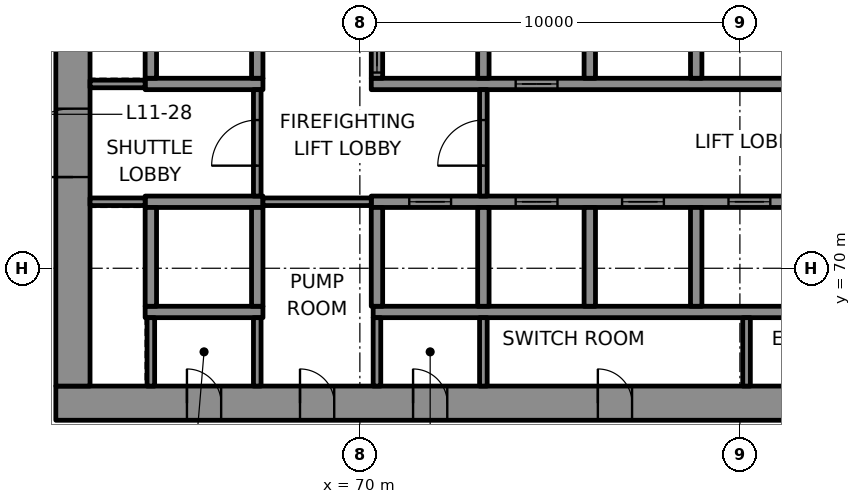
"""IFC4 building model, lengths in metres.
Left out: names, types, materials, properties, quantities, classifications, styles, units other than length and angle.
Written with IfcOpenShell. Run it as: python <this file> out.ifc"""

import sys

from ifc_helpers import new_model, si_unit, direction, frame, frame_2d, origin, place, context, subcontext, project, spatial, rectangle, extrude, element, fill, save


model = new_model("IFC4")
c1 = context("Model", 3, precision=1e-05, world=origin(), true_north=direction((0.0, 1.0)))
c2 = subcontext(c1, "Body", "Model", "MODEL_VIEW")
j1 = project(units=[si_unit("LENGTHUNIT", "METRE"), si_unit("PLANEANGLEUNIT", "RADIAN")], contexts=[c1])
p1 = place(None, origin())
s1 = spatial("IfcSite", under=j1, at=p1, CompositionType="ELEMENT")
p2 = place(p1, origin())
s2 = spatial("IfcBuilding", under=s1, at=p2, CompositionType="ELEMENT")
p3 = place(p2, frame((0.0, 0.0, 52.6)))
s3 = spatial("IfcBuildingStorey", under=s2, at=p3, CompositionType="ELEMENT", Elevation=52.6)
p4 = place(p3, frame((62.0, 66.45, 0.0), z_axis=(0.0, 0.0, 1.0), x_axis=(1.0, 0.0, 0.0)))
e1 = element("IfcWall", 1, at=p4, inside=s3, PredefinedType="SHEAR", context=c2, shape_type="SweptSolid", body=[
    extrude(rectangle(XDim=26.0, YDim=0.9, at=frame_2d((13.0, 0.0))), origin(), (0.0, 0.0, 1.0), 4.0),
])
p5 = place(p4, frame((3.45, 0.0, 0.0)))
e2 = element("IfcOpeningElement", 2, at=p5, cuts=e1, PredefinedType="OPENING", context=c2, shape_type="SweptSolid", body=[
    extrude(rectangle(XDim=0.9, YDim=2.1, at=frame_2d((0.45, 1.05))), frame((0.0, 0.46, 0.0), z_axis=(0.0, -1.0, 0.0), x_axis=(1.0, 0.0, 0.0)), (0.0, 0.0, 1.0), 0.92),
])
p6 = place(p4, frame((6.425, 0.0, 0.0)))
e3 = element("IfcOpeningElement", 3, at=p6, cuts=e1, PredefinedType="OPENING", context=c2, shape_type="SweptSolid", body=[
    extrude(rectangle(XDim=0.9, YDim=2.1, at=frame_2d((0.45, 1.05))), frame((0.0, 0.46, 0.0), z_axis=(0.0, -1.0, 0.0), x_axis=(1.0, 0.0, 0.0)), (0.0, 0.0, 1.0), 0.92),
])
p7 = place(p4, frame((9.4, 0.0, 0.0)))
e4 = element("IfcOpeningElement", 4, at=p7, cuts=e1, PredefinedType="OPENING", context=c2, shape_type="SweptSolid", body=[
    extrude(rectangle(XDim=0.9, YDim=2.1, at=frame_2d((0.45, 1.05))), frame((0.0, 0.46, 0.0), z_axis=(0.0, -1.0, 0.0), x_axis=(1.0, 0.0, 0.0)), (0.0, 0.0, 1.0), 0.92),
])
p8 = place(p4, frame((14.262, 0.0, 0.0)))
e5 = element("IfcOpeningElement", 5, at=p8, cuts=e1, PredefinedType="OPENING", context=c2, shape_type="SweptSolid", body=[
    extrude(rectangle(XDim=0.9, YDim=2.1, at=frame_2d((0.45, 1.05))), frame((0.0, 0.46, 0.0), z_axis=(0.0, -1.0, 0.0), x_axis=(1.0, 0.0, 0.0)), (0.0, 0.0, 1.0), 0.92),
])
p9 = place(p4, frame((21.188, 0.0, 0.0)))
e6 = element("IfcOpeningElement", 6, at=p9, cuts=e1, PredefinedType="OPENING", context=c2, shape_type="SweptSolid", body=[
    extrude(rectangle(XDim=0.9, YDim=2.1, at=frame_2d((0.45, 1.05))), frame((0.0, 0.46, 0.0), z_axis=(0.0, -1.0, 0.0), x_axis=(1.0, 0.0, 0.0)), (0.0, 0.0, 1.0), 0.92),
])
p10 = place(p3, frame((62.45, 66.9, 0.0), z_axis=(0.0, 0.0, 1.0), x_axis=(0.0, 1.0, 0.0)))
e7 = element("IfcWall", 7, at=p10, inside=s3, PredefinedType="SHEAR", context=c2, shape_type="SweptSolid", body=[
    extrude(rectangle(XDim=16.2, YDim=0.9, at=frame_2d((8.1, 0.0))), origin(), (0.0, 0.0, 1.0), 4.0),
])
p11 = place(p10, frame((5.5, 0.0, 0.0)))
e8 = element("IfcOpeningElement", 8, at=p11, cuts=e7, PredefinedType="OPENING", context=c2, shape_type="SweptSolid", body=[
    extrude(rectangle(XDim=1.8, YDim=2.1, at=frame_2d((0.9, 1.05))), frame((0.0, 0.46, 0.0), z_axis=(0.0, -1.0, 0.0), x_axis=(1.0, 0.0, 0.0)), (0.0, 0.0, 1.0), 0.92),
])
p12 = place(p3, frame((64.35, 68.85, 0.0), z_axis=(0.0, 0.0, 1.0), x_axis=(1.0, 0.0, 0.0)))
e9 = element("IfcWall", 9, at=p12, inside=s3, PredefinedType="SHEAR", context=c2, shape_type="SweptSolid", body=[
    extrude(rectangle(XDim=3.1, YDim=0.3, at=frame_2d((1.55, 0.0))), origin(), (0.0, 0.0, 1.0), 4.0),
])
p13 = place(p3, frame((70.35, 68.85, 0.0), z_axis=(0.0, 0.0, 1.0), x_axis=(1.0, 0.0, 0.0)))
e10 = element("IfcWall", 10, at=p13, inside=s3, PredefinedType="SHEAR", context=c2, shape_type="SweptSolid", body=[
    extrude(rectangle(XDim=16.75, YDim=0.3, at=frame_2d((8.375, 0.0))), origin(), (0.0, 0.0, 1.0), 4.0),
])
p14 = place(p3, frame((64.35, 71.75, 0.0), z_axis=(0.0, 0.0, 1.0), x_axis=(1.0, 0.0, 0.0)))
e11 = element("IfcWall", 11, at=p14, inside=s3, PredefinedType="SHEAR", context=c2, shape_type="SweptSolid", body=[
    extrude(rectangle(XDim=3.1, YDim=0.3, at=frame_2d((1.55, 0.0))), origin(), (0.0, 0.0, 1.0), 4.0),
])
p15 = place(p3, frame((70.3, 71.75, 0.0), z_axis=(0.0, 0.0, 1.0), x_axis=(1.0, 0.0, 0.0)))
e12 = element("IfcWall", 12, at=p15, inside=s3, PredefinedType="SHEAR", context=c2, shape_type="SweptSolid", body=[
    extrude(rectangle(XDim=16.8, YDim=0.3, at=frame_2d((8.4, 0.0))), origin(), (0.0, 0.0, 1.0), 4.0),
])
p16 = place(p15, frame((1.0, 0.0, 0.0)))
e13 = element("IfcOpeningElement", 13, at=p16, cuts=e12, PredefinedType="OPENING", context=c2, shape_type="SweptSolid", body=[
    extrude(rectangle(XDim=1.1, YDim=2.1, at=frame_2d((0.55, 1.05))), frame((0.0, 0.16, 0.0), z_axis=(0.0, -1.0, 0.0), x_axis=(1.0, 0.0, 0.0)), (0.0, 0.0, 1.0), 0.32),
])
p17 = place(p15, frame((3.8, 0.0, 0.0)))
e14 = element("IfcOpeningElement", 14, at=p17, cuts=e12, PredefinedType="OPENING", context=c2, shape_type="SweptSolid", body=[
    extrude(rectangle(XDim=1.1, YDim=2.1, at=frame_2d((0.55, 1.05))), frame((0.0, 0.16, 0.0), z_axis=(0.0, -1.0, 0.0), x_axis=(1.0, 0.0, 0.0)), (0.0, 0.0, 1.0), 0.32),
])
p18 = place(p15, frame((6.6, 0.0, 0.0)))
e15 = element("IfcOpeningElement", 15, at=p18, cuts=e12, PredefinedType="OPENING", context=c2, shape_type="SweptSolid", body=[
    extrude(rectangle(XDim=1.1, YDim=2.1, at=frame_2d((0.55, 1.05))), frame((0.0, 0.16, 0.0), z_axis=(0.0, -1.0, 0.0), x_axis=(1.0, 0.0, 0.0)), (0.0, 0.0, 1.0), 0.32),
])
p19 = place(p15, frame((9.4, 0.0, 0.0)))
e16 = element("IfcOpeningElement", 16, at=p19, cuts=e12, PredefinedType="OPENING", context=c2, shape_type="SweptSolid", body=[
    extrude(rectangle(XDim=1.1, YDim=2.1, at=frame_2d((0.55, 1.05))), frame((0.0, 0.16, 0.0), z_axis=(0.0, -1.0, 0.0), x_axis=(1.0, 0.0, 0.0)), (0.0, 0.0, 1.0), 0.32),
])
p20 = place(p15, frame((12.2, 0.0, 0.0)))
e17 = element("IfcOpeningElement", 17, at=p20, cuts=e12, PredefinedType="OPENING", context=c2, shape_type="SweptSolid", body=[
    extrude(rectangle(XDim=1.1, YDim=2.1, at=frame_2d((0.55, 1.05))), frame((0.0, 0.16, 0.0), z_axis=(0.0, -1.0, 0.0), x_axis=(1.0, 0.0, 0.0)), (0.0, 0.0, 1.0), 0.32),
])
p21 = place(p15, frame((14.925, 0.0, 0.0)))
e18 = element("IfcOpeningElement", 18, at=p21, cuts=e12, PredefinedType="OPENING", context=c2, shape_type="SweptSolid", body=[
    extrude(rectangle(XDim=1.1, YDim=2.1, at=frame_2d((0.55, 1.05))), frame((0.0, 0.16, 0.0), z_axis=(0.0, -1.0, 0.0), x_axis=(1.0, 0.0, 0.0)), (0.0, 0.0, 1.0), 0.32),
])
p22 = place(p3, frame((64.35, 74.85, 0.0), z_axis=(0.0, 0.0, 1.0), x_axis=(1.0, 0.0, 0.0)))
e19 = element("IfcWall", 19, at=p22, inside=s3, PredefinedType="SHEAR", context=c2, shape_type="SweptSolid", body=[
    extrude(rectangle(XDim=3.1, YDim=0.3, at=frame_2d((1.55, 0.0))), origin(), (0.0, 0.0, 1.0), 4.0),
])
p23 = place(p3, frame((70.3, 74.85, 0.0), z_axis=(0.0, 0.0, 1.0), x_axis=(1.0, 0.0, 0.0)))
e20 = element("IfcWall", 20, at=p23, inside=s3, PredefinedType="SHEAR", context=c2, shape_type="SweptSolid", body=[
    extrude(rectangle(XDim=16.8, YDim=0.3, at=frame_2d((8.4, 0.0))), origin(), (0.0, 0.0, 1.0), 4.0),
])
p24 = place(p23, frame((3.8, 0.0, 0.0)))
e21 = element("IfcOpeningElement", 21, at=p24, cuts=e20, PredefinedType="OPENING", context=c2, shape_type="SweptSolid", body=[
    extrude(rectangle(XDim=1.1, YDim=2.1, at=frame_2d((0.55, 1.05))), frame((0.0, 0.16, 0.0), z_axis=(0.0, -1.0, 0.0), x_axis=(1.0, 0.0, 0.0)), (0.0, 0.0, 1.0), 0.32),
])
p25 = place(p23, frame((12.2, 0.0, 0.0)))
e22 = element("IfcOpeningElement", 22, at=p25, cuts=e20, PredefinedType="OPENING", context=c2, shape_type="SweptSolid", body=[
    extrude(rectangle(XDim=1.1, YDim=2.1, at=frame_2d((0.55, 1.05))), frame((0.0, 0.16, 0.0), z_axis=(0.0, -1.0, 0.0), x_axis=(1.0, 0.0, 0.0)), (0.0, 0.0, 1.0), 0.32),
])
p26 = place(p23, frame((14.925, 0.0, 0.0)))
e23 = element("IfcOpeningElement", 23, at=p26, cuts=e20, PredefinedType="OPENING", context=c2, shape_type="SweptSolid", body=[
    extrude(rectangle(XDim=1.1, YDim=2.1, at=frame_2d((0.55, 1.05))), frame((0.0, 0.16, 0.0), z_axis=(0.0, -1.0, 0.0), x_axis=(1.0, 0.0, 0.0)), (0.0, 0.0, 1.0), 0.32),
])
for number, where, z_axis, x_axis in (
    (24, (64.5, 69.0, 0.0), (0.0, 0.0, 1.0), (0.0, 1.0, 0.0)),
    (25, (64.5, 75.0, 0.0), (0.0, 0.0, 1.0), (0.0, 1.0, 0.0)),
    (26, (67.3, 69.0, 0.0), (0.0, 0.0, 1.0), (0.0, 1.0, 0.0)),
    (27, (67.3, 75.0, 0.0), (0.0, 0.0, 1.0), (0.0, 1.0, 0.0)),
    (28, (70.45, 69.0, 0.0), (0.0, 0.0, 1.0), (0.0, 1.0, 0.0)),
):
    element("IfcWall", number, at=place(p3, frame(where, z_axis=z_axis, x_axis=x_axis)), inside=s3, PredefinedType="SHEAR", context=c2, shape_type="SweptSolid", body=[
        extrude(rectangle(XDim=2.6, YDim=0.3, at=frame_2d((1.3, 0.0))), origin(), (0.0, 0.0, 1.0), 4.0),
    ])
p27 = place(p3, frame((70.45, 75.0, 0.0), z_axis=(0.0, 0.0, 1.0), x_axis=(0.0, 1.0, 0.0)))
e29 = element("IfcWall", 29, at=p27, inside=s3, PredefinedType="SHEAR", context=c2, shape_type="SweptSolid", body=[
    extrude(rectangle(XDim=2.6, YDim=0.3, at=frame_2d((1.3, 0.0))), origin(), (0.0, 0.0, 1.0), 4.0),
])
p28 = place(p27, frame((0.15, 0.0, 0.0)))
e30 = element("IfcOpeningElement", 30, at=p28, cuts=e29, PredefinedType="OPENING", context=c2, shape_type="SweptSolid", body=[
    extrude(rectangle(XDim=1.1, YDim=2.1, at=frame_2d((0.55, 1.05))), frame((0.0, 0.16, 0.0), z_axis=(0.0, -1.0, 0.0), x_axis=(1.0, 0.0, 0.0)), (0.0, 0.0, 1.0), 0.32),
])
for number, where, z_axis, x_axis in (
    (31, (73.25, 69.0, 0.0), (0.0, 0.0, 1.0), (0.0, 1.0, 0.0)),
    (32, (73.25, 75.0, 0.0), (0.0, 0.0, 1.0), (0.0, 1.0, 0.0)),
    (33, (76.05, 69.0, 0.0), (0.0, 0.0, 1.0), (0.0, 1.0, 0.0)),
    (34, (76.05, 75.0, 0.0), (0.0, 0.0, 1.0), (0.0, 1.0, 0.0)),
    (35, (78.85, 69.0, 0.0), (0.0, 0.0, 1.0), (0.0, 1.0, 0.0)),
    (36, (78.85, 75.0, 0.0), (0.0, 0.0, 1.0), (0.0, 1.0, 0.0)),
):
    element("IfcWall", number, at=place(p3, frame(where, z_axis=z_axis, x_axis=x_axis)), inside=s3, PredefinedType="SHEAR", context=c2, shape_type="SweptSolid", body=[
        extrude(rectangle(XDim=2.6, YDim=0.3, at=frame_2d((1.3, 0.0))), origin(), (0.0, 0.0, 1.0), 4.0),
    ])
p29 = place(p3, frame((110.994, 61.012, 0.0), z_axis=(0.0, 0.0, 1.0), x_axis=(-0.500000853759, 0.866024910866, 0.0)))
e37 = element("IfcWall", 37, at=p29, inside=s3, PredefinedType="SOLIDWALL", context=c2, shape_type="SweptSolid", body=[
    extrude(rectangle(XDim=60.222, YDim=0.8, at=frame_2d((30.111, 0.0))), origin(), (0.0, 0.0, 1.0), 0.9),
])
p30 = place(p3, frame((62.9, 71.75, 0.0), z_axis=(0.0, 0.0, 1.0), x_axis=(1.0, 0.0, 0.0)))
e38 = element("IfcWall", 38, at=p30, inside=s3, PredefinedType="PARTITIONING", context=c2, shape_type="SweptSolid", body=[
    extrude(rectangle(XDim=1.45, YDim=0.2, at=frame_2d((0.725, 0.0))), origin(), (0.0, 0.0, 1.0), 4.0),
])
p31 = place(p3, frame((67.45, 71.75, 0.0), z_axis=(0.0, 0.0, 1.0), x_axis=(1.0, 0.0, 0.0)))
e39 = element("IfcWall", 39, at=p31, inside=s3, PredefinedType="PARTITIONING", context=c2, shape_type="SweptSolid", body=[
    extrude(rectangle(XDim=2.85, YDim=0.2, at=frame_2d((1.425, 0.0))), origin(), (0.0, 0.0, 1.0), 4.0),
])
p32 = place(p3, frame((62.9, 74.85, 0.0), z_axis=(0.0, 0.0, 1.0), x_axis=(1.0, 0.0, 0.0)))
e40 = element("IfcWall", 40, at=p32, inside=s3, PredefinedType="PARTITIONING", context=c2, shape_type="SweptSolid", body=[
    extrude(rectangle(XDim=1.45, YDim=0.2, at=frame_2d((0.725, 0.0))), origin(), (0.0, 0.0, 1.0), 4.0),
])
for number, where, z_axis, x_axis in (
    (41, (64.5, 66.9, 0.0), (0.0, 0.0, 1.0), (0.0, 1.0, 0.0)),
    (42, (67.3, 66.9, 0.0), (0.0, 0.0, 1.0), (0.0, 1.0, 0.0)),
):
    element("IfcWall", number, at=place(p3, frame(where, z_axis=z_axis, x_axis=x_axis)), inside=s3, PredefinedType="PARTITIONING", context=c2, shape_type="SweptSolid", body=[
        extrude(rectangle(XDim=1.8, YDim=0.2, at=frame_2d((0.9, 0.0))), origin(), (0.0, 0.0, 1.0), 4.0),
    ])
p33 = place(p3, frame((67.3, 71.9, 0.0), z_axis=(0.0, 0.0, 1.0), x_axis=(0.0, 1.0, 0.0)))
e43 = element("IfcWall", 43, at=p33, inside=s3, PredefinedType="PARTITIONING", context=c2, shape_type="SweptSolid", body=[
    extrude(rectangle(XDim=2.8, YDim=0.2, at=frame_2d((1.4, 0.0))), origin(), (0.0, 0.0, 1.0), 4.0),
])
p34 = place(p33, frame((0.8, 0.0, 0.0)))
e44 = element("IfcOpeningElement", 44, at=p34, cuts=e43, PredefinedType="OPENING", context=c2, shape_type="SweptSolid", body=[
    extrude(rectangle(XDim=1.2, YDim=2.1, at=frame_2d((0.6, 1.05))), frame((0.0, 0.11, 0.0), z_axis=(0.0, -1.0, 0.0), x_axis=(1.0, 0.0, 0.0)), (0.0, 0.0, 1.0), 0.22),
])
for number, where, z_axis, x_axis in (
    (45, (70.45, 66.9, 0.0), (0.0, 0.0, 1.0), (0.0, 1.0, 0.0)),
    (46, (73.25, 66.9, 0.0), (0.0, 0.0, 1.0), (0.0, 1.0, 0.0)),
):
    element("IfcWall", number, at=place(p3, frame(where, z_axis=z_axis, x_axis=x_axis)), inside=s3, PredefinedType="PARTITIONING", context=c2, shape_type="SweptSolid", body=[
        extrude(rectangle(XDim=1.8, YDim=0.2, at=frame_2d((0.9, 0.0))), origin(), (0.0, 0.0, 1.0), 4.0),
    ])
p35 = place(p3, frame((73.25, 71.9, 0.0), z_axis=(0.0, 0.0, 1.0), x_axis=(0.0, 1.0, 0.0)))
e47 = element("IfcWall", 47, at=p35, inside=s3, PredefinedType="PARTITIONING", context=c2, shape_type="SweptSolid", body=[
    extrude(rectangle(XDim=2.8, YDim=0.2, at=frame_2d((1.4, 0.0))), origin(), (0.0, 0.0, 1.0), 4.0),
])
p36 = place(p35, frame((0.8, 0.0, 0.0)))
e48 = element("IfcOpeningElement", 48, at=p36, cuts=e47, PredefinedType="OPENING", context=c2, shape_type="SweptSolid", body=[
    extrude(rectangle(XDim=1.2, YDim=2.1, at=frame_2d((0.6, 1.05))), frame((0.0, 0.11, 0.0), z_axis=(0.0, -1.0, 0.0), x_axis=(1.0, 0.0, 0.0)), (0.0, 0.0, 1.0), 0.22),
])
p37 = place(p3, frame((80.175, 66.9, 0.0), z_axis=(0.0, 0.0, 1.0), x_axis=(0.0, 1.0, 0.0)))
e49 = element("IfcWall", 49, at=p37, inside=s3, PredefinedType="PARTITIONING", context=c2, shape_type="SweptSolid", body=[
    extrude(rectangle(XDim=1.8, YDim=0.2, at=frame_2d((0.9, 0.0))), origin(), (0.0, 0.0, 1.0), 4.0),
])
p38 = place(p16, origin())
e50 = element("IfcDoor", 50, at=p38, inside=s3, OperationType="DOUBLE_DOOR_SLIDING", PredefinedType="DOOR", context=c2, shape_type="SweptSolid", body=[
    extrude(rectangle(XDim=1.1, YDim=2.1, at=frame_2d((0.55, 1.05))), frame((0.0, 0.025, 0.0), z_axis=(0.0, -1.0, 0.0), x_axis=(1.0, 0.0, 0.0)), (0.0, 0.0, 1.0), 0.05),
])
fill(e13, e50)
p39 = place(p17, origin())
e51 = element("IfcDoor", 51, at=p39, inside=s3, OperationType="DOUBLE_DOOR_SLIDING", PredefinedType="DOOR", context=c2, shape_type="SweptSolid", body=[
    extrude(rectangle(XDim=1.1, YDim=2.1, at=frame_2d((0.55, 1.05))), frame((0.0, 0.025, 0.0), z_axis=(0.0, -1.0, 0.0), x_axis=(1.0, 0.0, 0.0)), (0.0, 0.0, 1.0), 0.05),
])
fill(e14, e51)
p40 = place(p18, origin())
e52 = element("IfcDoor", 52, at=p40, inside=s3, OperationType="DOUBLE_DOOR_SLIDING", PredefinedType="DOOR", context=c2, shape_type="SweptSolid", body=[
    extrude(rectangle(XDim=1.1, YDim=2.1, at=frame_2d((0.55, 1.05))), frame((0.0, 0.025, 0.0), z_axis=(0.0, -1.0, 0.0), x_axis=(1.0, 0.0, 0.0)), (0.0, 0.0, 1.0), 0.05),
])
fill(e15, e52)
p41 = place(p19, origin())
e53 = element("IfcDoor", 53, at=p41, inside=s3, OperationType="DOUBLE_DOOR_SLIDING", PredefinedType="DOOR", context=c2, shape_type="SweptSolid", body=[
    extrude(rectangle(XDim=1.1, YDim=2.1, at=frame_2d((0.55, 1.05))), frame((0.0, 0.025, 0.0), z_axis=(0.0, -1.0, 0.0), x_axis=(1.0, 0.0, 0.0)), (0.0, 0.0, 1.0), 0.05),
])
fill(e16, e53)
p42 = place(p28, origin())
e54 = element("IfcDoor", 54, at=p42, inside=s3, OperationType="DOUBLE_DOOR_SLIDING", PredefinedType="DOOR", context=c2, shape_type="SweptSolid", body=[
    extrude(rectangle(XDim=1.1, YDim=2.1, at=frame_2d((0.55, 1.05))), frame((0.0, 0.025, 0.0), z_axis=(0.0, -1.0, 0.0), x_axis=(1.0, 0.0, 0.0)), (0.0, 0.0, 1.0), 0.05),
])
fill(e30, e54)
p43 = place(p24, origin())
e55 = element("IfcDoor", 55, at=p43, inside=s3, OperationType="DOUBLE_DOOR_SLIDING", PredefinedType="DOOR", context=c2, shape_type="SweptSolid", body=[
    extrude(rectangle(XDim=1.1, YDim=2.1, at=frame_2d((0.55, 1.05))), frame((0.0, 0.025, 0.0), z_axis=(0.0, -1.0, 0.0), x_axis=(1.0, 0.0, 0.0)), (0.0, 0.0, 1.0), 0.05),
])
fill(e21, e55)
p44 = place(p36, origin())
e56 = element("IfcDoor", 56, at=p44, inside=s3, OperationType="SINGLE_SWING_LEFT", PredefinedType="DOOR", context=c2, shape_type="SweptSolid", body=[
    extrude(rectangle(XDim=1.2, YDim=2.1, at=frame_2d((0.6, 1.05))), frame((0.0, 0.025, 0.0), z_axis=(0.0, -1.0, 0.0), x_axis=(1.0, 0.0, 0.0)), (0.0, 0.0, 1.0), 0.05),
])
fill(e48, e56)
p45 = place(p34, origin())
e57 = element("IfcDoor", 57, at=p45, inside=s3, OperationType="SINGLE_SWING_RIGHT", PredefinedType="DOOR", context=c2, shape_type="SweptSolid", body=[
    extrude(rectangle(XDim=1.2, YDim=2.1, at=frame_2d((0.6, 1.05))), frame((0.0, 0.025, 0.0), z_axis=(0.0, -1.0, 0.0), x_axis=(1.0, 0.0, 0.0)), (0.0, 0.0, 1.0), 0.05),
])
fill(e44, e57)
p46 = place(p11, origin())
e58 = element("IfcDoor", 58, at=p46, inside=s3, OperationType="SINGLE_SWING_LEFT", PredefinedType="DOOR", context=c2, shape_type="SweptSolid", body=[
    extrude(rectangle(XDim=1.8, YDim=2.1, at=frame_2d((0.9, 1.05))), frame((0.0, 0.17, 0.0), z_axis=(0.0, -1.0, 0.0), x_axis=(1.0, 0.0, 0.0)), (0.0, 0.0, 1.0), 0.34),
])
fill(e8, e58)
p47 = place(p5, origin())
e59 = element("IfcDoor", 59, at=p47, inside=s3, OperationType="SINGLE_SWING_LEFT", PredefinedType="DOOR", context=c2, shape_type="SweptSolid", body=[
    extrude(rectangle(XDim=0.9, YDim=2.1, at=frame_2d((0.45, 1.05))), frame((0.0, 0.17, 0.0), z_axis=(0.0, -1.0, 0.0), x_axis=(1.0, 0.0, 0.0)), (0.0, 0.0, 1.0), 0.34),
])
fill(e2, e59)
p48 = place(p6, origin())
e60 = element("IfcDoor", 60, at=p48, inside=s3, OperationType="SINGLE_SWING_RIGHT", PredefinedType="DOOR", context=c2, shape_type="SweptSolid", body=[
    extrude(rectangle(XDim=0.9, YDim=2.1, at=frame_2d((0.45, 1.05))), frame((0.0, 0.17, 0.0), z_axis=(0.0, -1.0, 0.0), x_axis=(1.0, 0.0, 0.0)), (0.0, 0.0, 1.0), 0.34),
])
fill(e3, e60)
p49 = place(p7, origin())
e61 = element("IfcDoor", 61, at=p49, inside=s3, OperationType="SINGLE_SWING_LEFT", PredefinedType="DOOR", context=c2, shape_type="SweptSolid", body=[
    extrude(rectangle(XDim=0.9, YDim=2.1, at=frame_2d((0.45, 1.05))), frame((0.0, 0.17, 0.0), z_axis=(0.0, -1.0, 0.0), x_axis=(1.0, 0.0, 0.0)), (0.0, 0.0, 1.0), 0.34),
])
fill(e4, e61)
p50 = place(p8, origin())
e62 = element("IfcDoor", 62, at=p50, inside=s3, OperationType="SINGLE_SWING_RIGHT", PredefinedType="DOOR", context=c2, shape_type="SweptSolid", body=[
    extrude(rectangle(XDim=0.9, YDim=2.1, at=frame_2d((0.45, 1.05))), frame((0.0, 0.17, 0.0), z_axis=(0.0, -1.0, 0.0), x_axis=(1.0, 0.0, 0.0)), (0.0, 0.0, 1.0), 0.34),
])
fill(e5, e62)
save(model, sys.argv[1])
